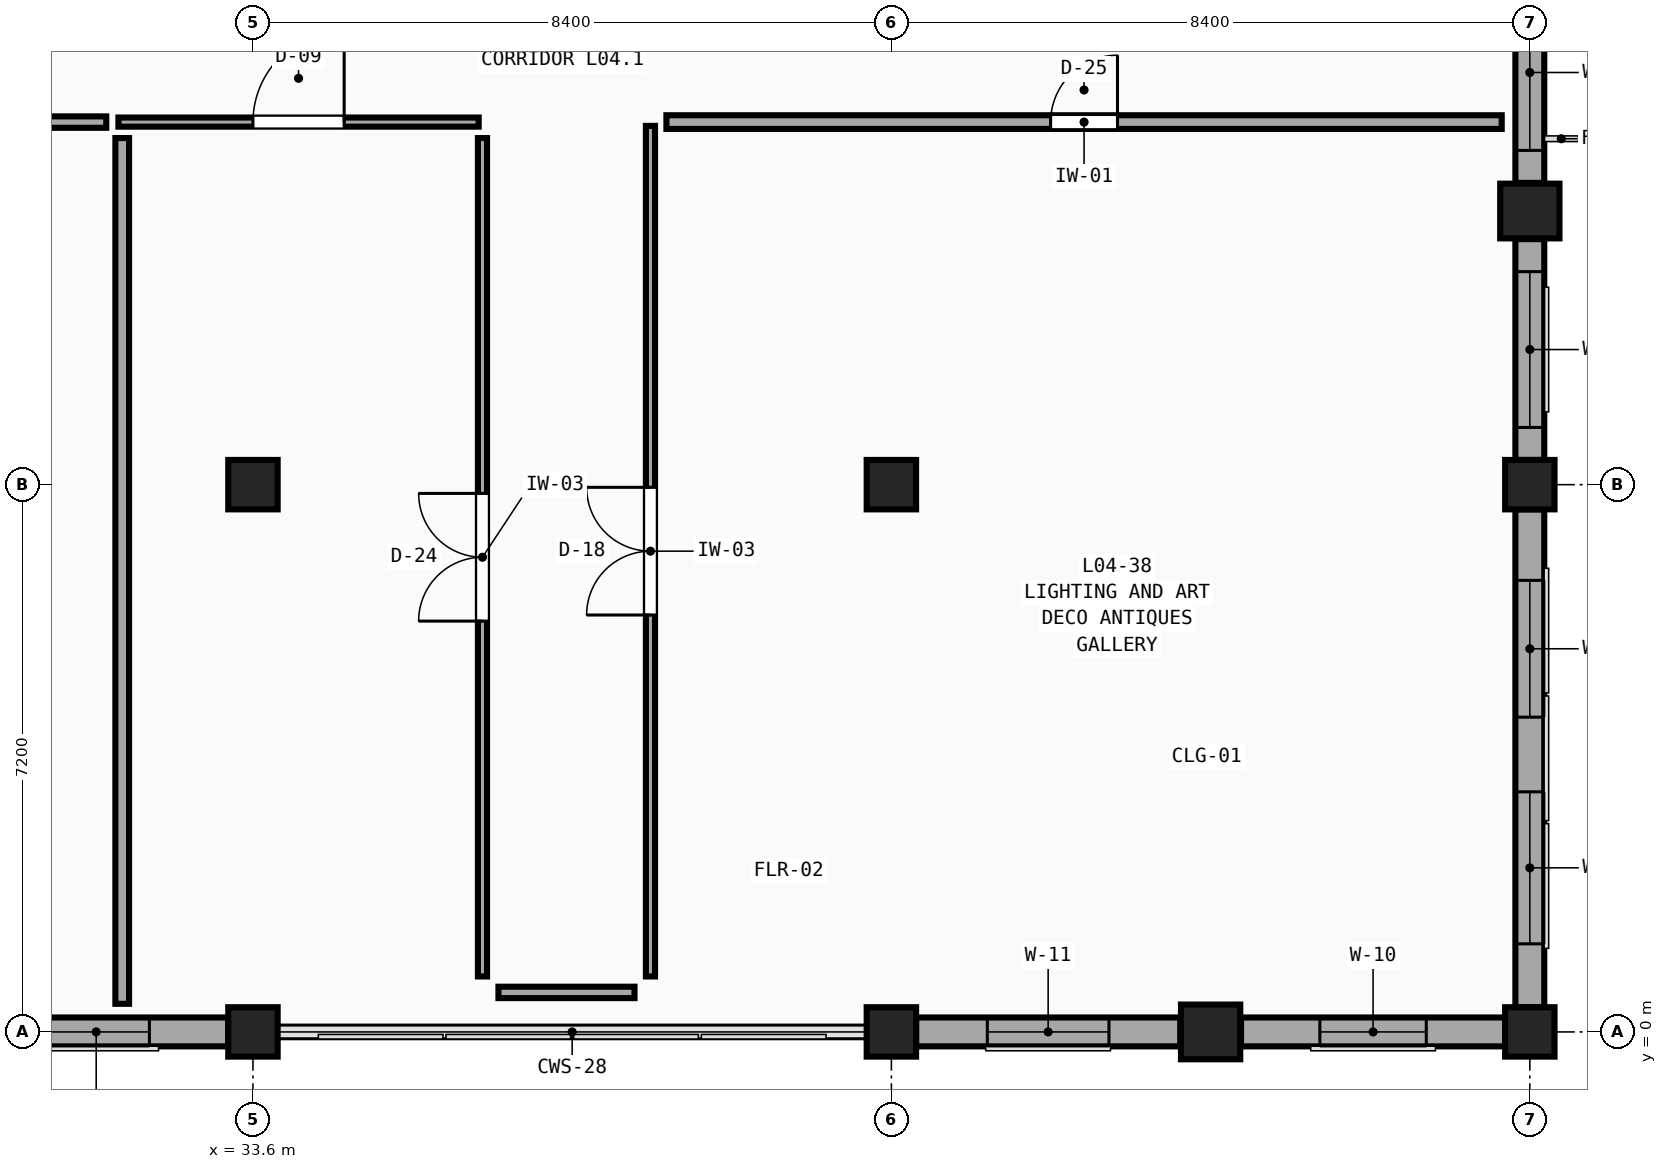
"""IFC4 building model, lengths in metres.
Left out: names, types, materials, properties, quantities, classifications, styles, units other than length and angle.
Written with IfcOpenShell. Run it as: python <this file> out.ifc"""

import sys

from ifc_helpers import new_model, si_unit, direction, frame, frame_2d, origin, origin_2d, place, context, subcontext, project, spatial, rectangle, extrude, element, fill, save


model = new_model("IFC4")
c1 = context("Model", 3, precision=1e-05, world=origin(), true_north=direction((0.0, 1.0)))
c2 = subcontext(c1, "Body", "Model", "MODEL_VIEW")
j1 = project(units=[si_unit("LENGTHUNIT", "METRE"), si_unit("PLANEANGLEUNIT", "RADIAN")], contexts=[c1])
p1 = place(None, origin())
s1 = spatial("IfcSite", under=j1, at=p1, CompositionType="ELEMENT")
p2 = place(p1, origin())
s2 = spatial("IfcBuilding", under=s1, at=p2, CompositionType="ELEMENT")
p3 = place(p2, frame((0.0, 0.0, 18.9)))
s3 = spatial("IfcBuildingStorey", under=s2, at=p3, CompositionType="ELEMENT", Elevation=18.9)
for number, where, z_axis, x_axis in (
    (1, (33.6, 0.0, 0.0), (0.0, 0.0, 1.0), (1.0, 0.0, 0.0)),
    (2, (33.6, 7.2, 0.0), (0.0, 0.0, 1.0), (1.0, 0.0, 0.0)),
    (3, (42.0, 0.0, 0.0), (0.0, 0.0, 1.0), (1.0, 0.0, 0.0)),
    (4, (42.0, 7.2, 0.0), (0.0, 0.0, 1.0), (1.0, 0.0, 0.0)),
    (5, (50.4, 0.0, 0.0), (0.0, 0.0, 1.0), (1.0, 0.0, 0.0)),
    (6, (50.4, 7.2, 0.0), (0.0, 0.0, 1.0), (1.0, 0.0, 0.0)),
):
    element("IfcColumn", number, at=place(p3, frame(where, z_axis=z_axis, x_axis=x_axis)), inside=s3, PredefinedType="COLUMN", context=c2, shape_type="SweptSolid", body=[
        extrude(rectangle(XDim=0.65, YDim=0.65, at=origin_2d()), origin(), (0.0, 0.0, 1.0), 4.5),
    ])
for number, where, z_axis, x_axis in (
    (7, (46.2, 0.0, 0.0), (0.0, 0.0, 1.0), (1.0, 0.0, 0.0)),
    (8, (50.4, 10.8, 0.0), (0.0, 0.0, 1.0), (1.0, 0.0, 0.0)),
):
    element("IfcColumn", number, at=place(p3, frame(where, z_axis=z_axis, x_axis=x_axis)), inside=s3, PredefinedType="PILASTER", context=c2, shape_type="SweptSolid", body=[
        extrude(rectangle(XDim=0.78, YDim=0.72, at=origin_2d()), origin(), (0.0, 0.0, 1.0), 4.5),
    ])
p4 = place(p3, frame((33.275, 0.0, 0.0), z_axis=(0.0, 0.0, 1.0), x_axis=(-1.0, 0.0, 0.0)))
e9 = element("IfcWall", 9, at=p4, inside=s3, PredefinedType="SOLIDWALL", context=c2, shape_type="SweptSolid", body=[
    extrude(rectangle(XDim=3.475, YDim=0.38, at=frame_2d((1.737, 0.0))), origin(), (0.0, 0.0, 1.0), 3.63),
])
p5 = place(p4, frame((1.038, 0.0, 0.75)))
e10 = element("IfcOpeningElement", 10, at=p5, cuts=e9, PredefinedType="OPENING", context=c2, shape_type="SweptSolid", body=[
    extrude(rectangle(XDim=1.4, YDim=1.9, at=frame_2d((0.7, 0.95))), frame((0.0, 0.21, 0.0), z_axis=(0.0, -1.0, 0.0), x_axis=(1.0, 0.0, 0.0)), (0.0, 0.0, 1.0), 0.42),
])
p6 = place(p3, frame((50.075, 0.0, 0.0), z_axis=(0.0, 0.0, 1.0), x_axis=(-1.0, 0.0, 0.0)))
e11 = element("IfcWall", 11, at=p6, inside=s3, PredefinedType="SOLIDWALL", context=c2, shape_type="SweptSolid", body=[
    extrude(rectangle(XDim=3.475, YDim=0.38, at=frame_2d((1.737, 0.0))), origin(), (0.0, 0.0, 1.0), 3.63),
])
p7 = place(p6, frame((1.038, 0.0, 0.75)))
e12 = element("IfcOpeningElement", 12, at=p7, cuts=e11, PredefinedType="OPENING", context=c2, shape_type="SweptSolid", body=[
    extrude(rectangle(XDim=1.4, YDim=2.08, at=frame_2d((0.7, 1.04))), frame((0.0, 0.21, 0.0), z_axis=(0.0, -1.0, 0.0), x_axis=(1.0, 0.0, 0.0)), (0.0, 0.0, 1.0), 0.42),
])
p8 = place(p3, frame((45.8, 0.0, 0.0), z_axis=(0.0, 0.0, 1.0), x_axis=(-1.0, 0.0, 0.0)))
e13 = element("IfcWall", 13, at=p8, inside=s3, PredefinedType="SOLIDWALL", context=c2, shape_type="SweptSolid", body=[
    extrude(rectangle(XDim=3.475, YDim=0.38, at=frame_2d((1.738, 0.0))), origin(), (0.0, 0.0, 1.0), 3.63),
])
p9 = place(p8, frame((0.938, 0.0, 0.75)))
e14 = element("IfcOpeningElement", 14, at=p9, cuts=e13, PredefinedType="OPENING", context=c2, shape_type="SweptSolid", body=[
    extrude(rectangle(XDim=1.6, YDim=2.08, at=frame_2d((0.8, 1.04))), frame((0.0, 0.21, 0.0), z_axis=(0.0, -1.0, 0.0), x_axis=(1.0, 0.0, 0.0)), (0.0, 0.0, 1.0), 0.42),
])
p10 = place(p3, frame((50.4, 6.875, 0.0), z_axis=(0.0, 0.0, 1.0), x_axis=(0.0, -1.0, 0.0)))
e15 = element("IfcWall", 15, at=p10, inside=s3, PredefinedType="SOLIDWALL", context=c2, shape_type="SweptSolid", body=[
    extrude(rectangle(XDim=6.55, YDim=0.38, at=frame_2d((3.275, 0.0))), origin(), (0.0, 0.0, 1.0), 3.63),
])
p11 = place(p10, frame((0.934, 0.0, 0.75)))
e16 = element("IfcOpeningElement", 16, at=p11, cuts=e15, PredefinedType="OPENING", context=c2, shape_type="SweptSolid", body=[
    extrude(rectangle(XDim=1.8, YDim=2.08, at=frame_2d((0.9, 1.04))), frame((0.0, 0.21, 0.0), z_axis=(0.0, -1.0, 0.0), x_axis=(1.0, 0.0, 0.0)), (0.0, 0.0, 1.0), 0.42),
])
p12 = place(p10, frame((3.716, 0.0, 0.75)))
e17 = element("IfcOpeningElement", 17, at=p12, cuts=e15, PredefinedType="OPENING", context=c2, shape_type="SweptSolid", body=[
    extrude(rectangle(XDim=2.0, YDim=2.08, at=frame_2d((1.0, 1.04))), frame((0.0, 0.21, 0.0), z_axis=(0.0, -1.0, 0.0), x_axis=(1.0, 0.0, 0.0)), (0.0, 0.0, 1.0), 0.42),
])
p13 = place(p3, frame((50.4, 14.075, 0.0), z_axis=(0.0, 0.0, 1.0), x_axis=(0.0, -1.0, 0.0)))
e18 = element("IfcWall", 18, at=p13, inside=s3, PredefinedType="SOLIDWALL", context=c2, shape_type="SweptSolid", body=[
    extrude(rectangle(XDim=2.905, YDim=0.38, at=frame_2d((1.453, 0.0))), origin(), (0.0, 0.0, 1.0), 3.63),
])
p14 = place(p13, frame((0.427, 0.0, 0.75)))
e19 = element("IfcOpeningElement", 19, at=p14, cuts=e18, PredefinedType="OPENING", context=c2, shape_type="SweptSolid", body=[
    extrude(rectangle(XDim=2.05, YDim=2.08, at=frame_2d((1.025, 1.04))), frame((0.0, 0.21, 0.0), z_axis=(0.0, -1.0, 0.0), x_axis=(1.0, 0.0, 0.0)), (0.0, 0.0, 1.0), 0.42),
])
p15 = place(p3, frame((50.4, 10.43, 0.0), z_axis=(0.0, 0.0, 1.0), x_axis=(0.0, -1.0, 0.0)))
e20 = element("IfcWall", 20, at=p15, inside=s3, PredefinedType="SOLIDWALL", context=c2, shape_type="SweptSolid", body=[
    extrude(rectangle(XDim=2.905, YDim=0.38, at=frame_2d((1.453, 0.0))), origin(), (0.0, 0.0, 1.0), 3.63),
])
p16 = place(p15, frame((0.427, 0.0, 0.75)))
e21 = element("IfcOpeningElement", 21, at=p16, cuts=e20, PredefinedType="OPENING", context=c2, shape_type="SweptSolid", body=[
    extrude(rectangle(XDim=2.05, YDim=2.08, at=frame_2d((1.025, 1.04))), frame((0.0, 0.21, 0.0), z_axis=(0.0, -1.0, 0.0), x_axis=(1.0, 0.0, 0.0)), (0.0, 0.0, 1.0), 0.42),
])
p17 = place(p3, frame((38.83, 0.73, 0.0), z_axis=(0.0, 0.0, 1.0), x_axis=(0.0, 1.0, 0.0)))
e22 = element("IfcWall", 22, at=p17, inside=s3, PredefinedType="PARTITIONING", context=c2, shape_type="SweptSolid", body=[
    extrude(rectangle(XDim=11.19, YDim=0.12, at=frame_2d((5.595, 0.0))), origin(), (0.0, 0.0, 1.0), 4.18),
])
p18 = place(p17, frame((4.755, 0.0, 0.0)))
e23 = element("IfcOpeningElement", 23, at=p18, cuts=e22, PredefinedType="OPENING", context=c2, shape_type="SweptSolid", body=[
    extrude(rectangle(XDim=1.68, YDim=2.21, at=frame_2d((0.84, 1.105))), frame((0.0, 0.08, 0.0), z_axis=(0.0, -1.0, 0.0), x_axis=(1.0, 0.0, 0.0)), (0.0, 0.0, 1.0), 0.16),
])
p19 = place(p3, frame((36.62, 0.73, 0.0), z_axis=(0.0, 0.0, 1.0), x_axis=(0.0, 1.0, 0.0)))
e24 = element("IfcWall", 24, at=p19, inside=s3, PredefinedType="PARTITIONING", context=c2, shape_type="SweptSolid", body=[
    extrude(rectangle(XDim=11.03, YDim=0.12, at=frame_2d((5.515, 0.0))), origin(), (0.0, 0.0, 1.0), 4.18),
])
p20 = place(p19, frame((4.675, 0.0, 0.0)))
e25 = element("IfcOpeningElement", 25, at=p20, cuts=e24, PredefinedType="OPENING", context=c2, shape_type="SweptSolid", body=[
    extrude(rectangle(XDim=1.68, YDim=2.29, at=frame_2d((0.84, 1.145))), frame((0.0, 0.08, 0.0), z_axis=(0.0, -1.0, 0.0), x_axis=(1.0, 0.0, 0.0)), (0.0, 0.0, 1.0), 0.16),
])
p21 = place(p3, frame((39.04, 11.97, 0.0), z_axis=(0.0, 0.0, 1.0), x_axis=(1.0, 0.0, 0.0)))
e26 = element("IfcWall", 26, at=p21, inside=s3, PredefinedType="PARTITIONING", context=c2, shape_type="SweptSolid", body=[
    extrude(rectangle(XDim=10.99, YDim=0.18, at=frame_2d((5.495, 0.0))), origin(), (0.0, 0.0, 1.0), 4.18),
])
p22 = place(p21, frame((5.055, 0.0, 0.0)))
e27 = element("IfcOpeningElement", 27, at=p22, cuts=e26, PredefinedType="OPENING", context=c2, shape_type="SweptSolid", body=[
    extrude(rectangle(XDim=0.88, YDim=2.37, at=frame_2d((0.44, 1.185))), frame((0.0, 0.11, 0.0), z_axis=(0.0, -1.0, 0.0), x_axis=(1.0, 0.0, 0.0)), (0.0, 0.0, 1.0), 0.22),
])
p23 = place(p3, frame((22.24, 11.97, 0.0), z_axis=(0.0, 0.0, 1.0), x_axis=(1.0, 0.0, 0.0)))
e28 = element("IfcWall", 28, at=p23, inside=s3, PredefinedType="PARTITIONING", context=c2, shape_type="SweptSolid", body=[
    extrude(rectangle(XDim=9.43, YDim=0.15, at=frame_2d((4.715, 0.0))), origin(), (0.0, 0.0, 1.0), 4.18),
])
p24 = place(p23, frame((4.195, 0.0, 0.0)))
e29 = element("IfcOpeningElement", 29, at=p24, cuts=e28, PredefinedType="OPENING", context=c2, shape_type="SweptSolid", body=[
    extrude(rectangle(XDim=1.04, YDim=2.05, at=frame_2d((0.52, 1.025))), frame((0.0, 0.095, 0.0), z_axis=(0.0, -1.0, 0.0), x_axis=(1.0, 0.0, 0.0)), (0.0, 0.0, 1.0), 0.19),
])
p25 = place(p3, frame((31.83, 11.97, 0.0), z_axis=(0.0, 0.0, 1.0), x_axis=(1.0, 0.0, 0.0)))
e30 = element("IfcWall", 30, at=p25, inside=s3, PredefinedType="PARTITIONING", context=c2, shape_type="SweptSolid", body=[
    extrude(rectangle(XDim=4.74, YDim=0.12, at=frame_2d((2.37, 0.0))), origin(), (0.0, 0.0, 1.0), 4.18),
])
p26 = place(p25, frame((1.77, 0.0, 0.0)))
e31 = element("IfcOpeningElement", 31, at=p26, cuts=e30, PredefinedType="OPENING", context=c2, shape_type="SweptSolid", body=[
    extrude(rectangle(XDim=1.2, YDim=2.13, at=frame_2d((0.6, 1.065))), frame((0.0, 0.08, 0.0), z_axis=(0.0, -1.0, 0.0), x_axis=(1.0, 0.0, 0.0)), (0.0, 0.0, 1.0), 0.16),
])
p27 = place(p3, frame((36.83, 0.52, 0.0), z_axis=(0.0, 0.0, 1.0), x_axis=(1.0, 0.0, 0.0)))
e32 = element("IfcWall", 32, at=p27, inside=s3, PredefinedType="PARTITIONING", context=c2, shape_type="SweptSolid", body=[
    extrude(rectangle(XDim=1.79, YDim=0.15, at=frame_2d((0.895, 0.0))), origin(), (0.0, 0.0, 1.0), 3.63),
])
p28 = place(p3, frame((31.88, 0.37, 0.0), z_axis=(0.0, 0.0, 1.0), x_axis=(0.0, 1.0, 0.0)))
e33 = element("IfcWall", 33, at=p28, inside=s3, PredefinedType="PARTITIONING", context=c2, shape_type="SweptSolid", body=[
    extrude(rectangle(XDim=11.39, YDim=0.18, at=frame_2d((5.695, 0.0))), origin(), (0.0, 0.0, 1.0), 4.18),
])
p29 = place(p5, origin())
e34 = element("IfcWindow", 34, at=p29, inside=s3, PartitioningType="DOUBLE_PANEL_VERTICAL", PredefinedType="WINDOW", context=c2, shape_type="SweptSolid", body=[
    extrude(rectangle(XDim=1.4, YDim=1.9, at=frame_2d((0.7, 0.95))), frame((0.0, 0.03, 0.0), z_axis=(0.0, -1.0, 0.0), x_axis=(1.0, 0.0, 0.0)), (0.0, 0.0, 1.0), 0.06),
])
fill(e10, e34)
p30 = place(p7, origin())
e35 = element("IfcWindow", 35, at=p30, inside=s3, PartitioningType="DOUBLE_PANEL_VERTICAL", PredefinedType="WINDOW", context=c2, shape_type="SweptSolid", body=[
    extrude(rectangle(XDim=1.4, YDim=2.08, at=frame_2d((0.7, 1.04))), frame((0.0, 0.03, 0.0), z_axis=(0.0, -1.0, 0.0), x_axis=(1.0, 0.0, 0.0)), (0.0, 0.0, 1.0), 0.06),
])
fill(e12, e35)
p31 = place(p9, origin())
e36 = element("IfcWindow", 36, at=p31, inside=s3, PartitioningType="DOUBLE_PANEL_VERTICAL", PredefinedType="WINDOW", context=c2, shape_type="SweptSolid", body=[
    extrude(rectangle(XDim=1.6, YDim=2.08, at=frame_2d((0.8, 1.04))), frame((0.0, 0.03, 0.0), z_axis=(0.0, -1.0, 0.0), x_axis=(1.0, 0.0, 0.0)), (0.0, 0.0, 1.0), 0.06),
])
fill(e14, e36)
p32 = place(p11, origin())
e37 = element("IfcWindow", 37, at=p32, inside=s3, PartitioningType="DOUBLE_PANEL_VERTICAL", PredefinedType="WINDOW", context=c2, shape_type="SweptSolid", body=[
    extrude(rectangle(XDim=1.8, YDim=2.08, at=frame_2d((0.9, 1.04))), frame((0.0, 0.03, 0.0), z_axis=(0.0, -1.0, 0.0), x_axis=(1.0, 0.0, 0.0)), (0.0, 0.0, 1.0), 0.06),
])
fill(e16, e37)
p33 = place(p12, origin())
e38 = element("IfcWindow", 38, at=p33, inside=s3, PartitioningType="TRIPLE_PANEL_VERTICAL", PredefinedType="WINDOW", context=c2, shape_type="SweptSolid", body=[
    extrude(rectangle(XDim=2.0, YDim=2.08, at=frame_2d((1.0, 1.04))), frame((0.0, 0.03, 0.0), z_axis=(0.0, -1.0, 0.0), x_axis=(1.0, 0.0, 0.0)), (0.0, 0.0, 1.0), 0.06),
])
fill(e17, e38)
p34 = place(p14, origin())
e39 = element("IfcWindow", 39, at=p34, inside=s3, PartitioningType="TRIPLE_PANEL_VERTICAL", PredefinedType="WINDOW", context=c2, shape_type="SweptSolid", body=[
    extrude(rectangle(XDim=2.05, YDim=2.08, at=frame_2d((1.025, 1.04))), frame((0.0, 0.03, 0.0), z_axis=(0.0, -1.0, 0.0), x_axis=(1.0, 0.0, 0.0)), (0.0, 0.0, 1.0), 0.06),
])
fill(e19, e39)
p35 = place(p16, origin())
e40 = element("IfcWindow", 40, at=p35, inside=s3, PartitioningType="TRIPLE_PANEL_VERTICAL", PredefinedType="WINDOW", context=c2, shape_type="SweptSolid", body=[
    extrude(rectangle(XDim=2.05, YDim=2.08, at=frame_2d((1.025, 1.04))), frame((0.0, 0.03, 0.0), z_axis=(0.0, -1.0, 0.0), x_axis=(1.0, 0.0, 0.0)), (0.0, 0.0, 1.0), 0.06),
])
fill(e21, e40)
p36 = place(p18, origin())
e41 = element("IfcDoor", 41, at=p36, inside=s3, OperationType="DOUBLE_DOOR_SINGLE_SWING", PredefinedType="DOOR", context=c2, shape_type="SweptSolid", body=[
    extrude(rectangle(XDim=1.68, YDim=2.21, at=frame_2d((0.84, 1.105))), frame((0.0, 0.025, 0.0), z_axis=(0.0, -1.0, 0.0), x_axis=(1.0, 0.0, 0.0)), (0.0, 0.0, 1.0), 0.05),
])
fill(e23, e41)
p37 = place(p20, origin())
e42 = element("IfcDoor", 42, at=p37, inside=s3, OperationType="DOUBLE_DOOR_SINGLE_SWING", PredefinedType="DOOR", context=c2, shape_type="SweptSolid", body=[
    extrude(rectangle(XDim=1.68, YDim=2.29, at=frame_2d((0.84, 1.145))), frame((0.0, 0.025, 0.0), z_axis=(0.0, -1.0, 0.0), x_axis=(1.0, 0.0, 0.0)), (0.0, 0.0, 1.0), 0.05),
])
fill(e25, e42)
p38 = place(p22, origin())
e43 = element("IfcDoor", 43, at=p38, inside=s3, OperationType="SINGLE_SWING_RIGHT", PredefinedType="DOOR", context=c2, shape_type="SweptSolid", body=[
    extrude(rectangle(XDim=0.88, YDim=2.37, at=frame_2d((0.44, 1.185))), frame((0.0, 0.025, 0.0), z_axis=(0.0, -1.0, 0.0), x_axis=(1.0, 0.0, 0.0)), (0.0, 0.0, 1.0), 0.05),
])
fill(e27, e43)
p39 = place(p26, origin())
e44 = element("IfcDoor", 44, at=p39, inside=s3, OperationType="SINGLE_SWING_RIGHT", PredefinedType="DOOR", context=c2, shape_type="SweptSolid", body=[
    extrude(rectangle(XDim=1.2, YDim=2.13, at=frame_2d((0.6, 1.065))), frame((0.0, 0.025, 0.0), z_axis=(0.0, -1.0, 0.0), x_axis=(1.0, 0.0, 0.0)), (0.0, 0.0, 1.0), 0.05),
])
fill(e31, e44)
save(model, sys.argv[1])
